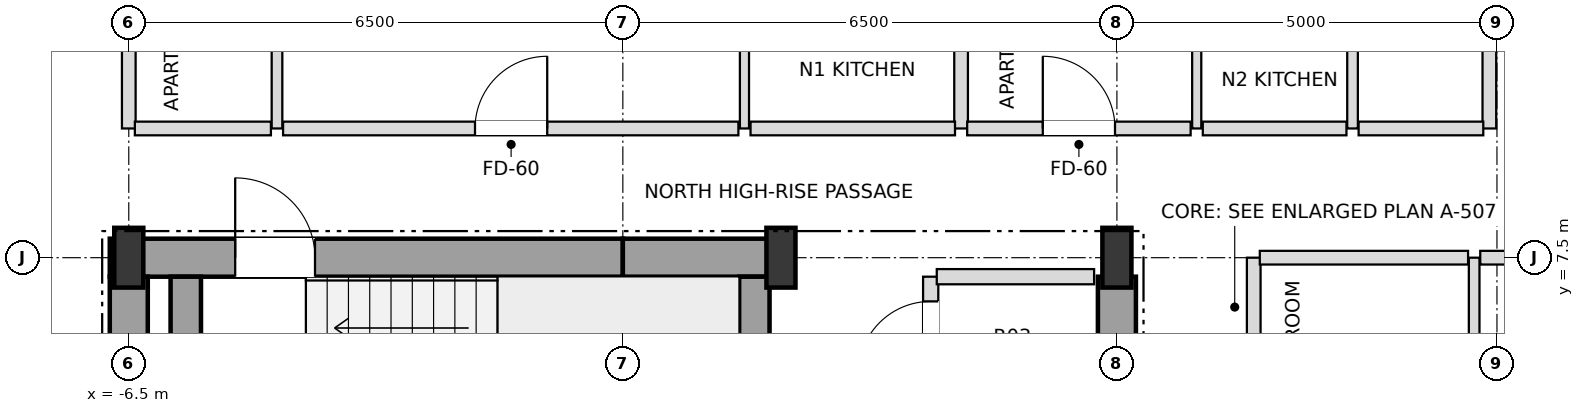
"""IFC4 building model, lengths in metres.
Left out: names, types, materials, properties, quantities, classifications, styles, units other than length and angle.
Written with IfcOpenShell. Run it as: python <this file> out.ifc"""

import sys

from ifc_helpers import new_model, si_unit, direction, frame, frame_2d, origin, origin_2d, place, context, subcontext, project, spatial, rectangle, i_section, extrude, element, fill, save


model = new_model("IFC4")
c1 = context("Model", 3, precision=1e-05, world=origin(), true_north=direction((0.0, 1.0)))
c2 = subcontext(c1, "Body", "Model", "MODEL_VIEW")
j1 = project(units=[si_unit("LENGTHUNIT", "METRE"), si_unit("PLANEANGLEUNIT", "RADIAN")], contexts=[c1])
p1 = place(None, origin())
s1 = spatial("IfcSite", under=j1, at=p1, CompositionType="ELEMENT")
p2 = place(p1, origin())
s2 = spatial("IfcBuilding", under=s1, at=p2, CompositionType="ELEMENT")
p3 = place(p2, frame((0.0, 0.0, 247.5)))
s3 = spatial("IfcBuildingStorey", under=s2, at=p3, CompositionType="ELEMENT", Elevation=247.5)
for number, where, z_axis, x_axis in (
    (1, (-6.5, 7.5, 0.0), (0.0, 0.0, 1.0), (1.0, 0.0, 0.0)),
    (2, (2.08, 7.5, 0.0), (0.0, 0.0, 1.0), (1.0, 0.0, 0.0)),
    (3, (6.5, 7.5, 0.0), (0.0, 0.0, 1.0), (1.0, 0.0, 0.0)),
):
    element("IfcColumn", number, at=place(p3, frame(where, z_axis=z_axis, x_axis=x_axis)), inside=s3, PredefinedType="COLUMN", context=c2, shape_type="SweptSolid", body=[
        extrude(i_section(OverallWidth=0.382, OverallDepth=0.786, WebThickness=0.02, FlangeThickness=0.033, at=origin_2d()), origin(), (0.0, 0.0, 1.0), 3.6),
    ])
p4 = place(p3, frame((-6.75, 7.5, 0.0), z_axis=(0.0, 0.0, 1.0), x_axis=(1.0, 0.0, 0.0)))
e4 = element("IfcWall", 4, at=p4, inside=s3, PredefinedType="SHEAR", context=c2, shape_type="SweptSolid", body=[
    extrude(rectangle(XDim=6.75, YDim=0.5, at=frame_2d((3.375, 0.0))), origin(), (0.0, 0.0, 1.0), 3.38),
])
p5 = place(p4, frame((1.65, 0.0, 0.0)))
e5 = element("IfcOpeningElement", 5, at=p5, cuts=e4, PredefinedType="OPENING", context=c2, shape_type="SweptSolid", body=[
    extrude(rectangle(XDim=1.05, YDim=2.15, at=frame_2d((0.525, 1.075))), frame((0.0, 0.26, 0.0), z_axis=(0.0, -1.0, 0.0), x_axis=(1.0, 0.0, 0.0)), (0.0, 0.0, 1.0), 0.52),
])
p6 = place(p3, frame((0.0, 7.5, 0.0), z_axis=(0.0, 0.0, 1.0), x_axis=(1.0, 0.0, 0.0)))
e6 = element("IfcWall", 6, at=p6, inside=s3, PredefinedType="SHEAR", context=c2, shape_type="SweptSolid", body=[
    extrude(rectangle(XDim=2.08, YDim=0.5, at=frame_2d((1.04, 0.0))), origin(), (0.0, 0.0, 1.0), 3.38),
])
for number, where, z_axis, x_axis in (
    (7, (-6.5, 3.95, 0.0), (0.0, 0.0, 1.0), (0.0, 1.0, 0.0)),
    (8, (6.5, 3.95, 0.0), (0.0, 0.0, 1.0), (0.0, 1.0, 0.0)),
):
    element("IfcWall", number, at=place(p3, frame(where, z_axis=z_axis, x_axis=x_axis)), inside=s3, PredefinedType="SHEAR", context=c2, shape_type="SweptSolid", body=[
        extrude(rectangle(XDim=3.3, YDim=0.5, at=frame_2d((1.65, 0.0))), origin(), (0.0, 0.0, 1.0), 3.38),
    ])
for number, where, z_axis, x_axis in (
    (9, (1.73, 3.95, 0.0), (0.0, 0.0, 1.0), (0.0, 1.0, 0.0)),
    (10, (-5.75, 3.95, 0.0), (0.0, 0.0, 1.0), (0.0, 1.0, 0.0)),
):
    element("IfcWall", number, at=place(p3, frame(where, z_axis=z_axis, x_axis=x_axis)), inside=s3, PredefinedType="SHEAR", context=c2, shape_type="SweptSolid", body=[
        extrude(rectangle(XDim=3.3, YDim=0.4, at=frame_2d((1.65, 0.0))), origin(), (0.0, 0.0, 1.0), 3.38),
    ])
p7 = place(p3, frame((-6.5, 9.2, 0.0), z_axis=(0.0, 0.0, 1.0), x_axis=(0.0, 1.0, 0.0)))
e11 = element("IfcWall", 11, at=p7, inside=s3, PredefinedType="PARTITIONING", context=c2, shape_type="SweptSolid", body=[
    extrude(rectangle(XDim=10.7, YDim=0.18, at=frame_2d((5.35, 0.0))), origin(), (0.0, 0.0, 1.0), 2.826),
])
p8 = place(p3, frame((-4.55, 9.2, 0.0), z_axis=(0.0, 0.0, 1.0), x_axis=(0.0, 1.0, 0.0)))
e12 = element("IfcWall", 12, at=p8, inside=s3, PredefinedType="PARTITIONING", context=c2, shape_type="SweptSolid", body=[
    extrude(rectangle(XDim=4.7, YDim=0.14, at=frame_2d((2.35, 0.0))), origin(), (0.0, 0.0, 1.0), 3.38),
])
p9 = place(p8, frame((1.9, 0.0, 0.0)))
e13 = element("IfcOpeningElement", 13, at=p9, cuts=e12, PredefinedType="OPENING", context=c2, shape_type="SweptSolid", body=[
    extrude(rectangle(XDim=0.9, YDim=2.1, at=frame_2d((0.45, 1.05))), frame((0.0, 0.08, 0.0), z_axis=(0.0, -1.0, 0.0), x_axis=(1.0, 0.0, 0.0)), (0.0, 0.0, 1.0), 0.16),
])
p10 = place(p3, frame((1.6, 9.2, 0.0), z_axis=(0.0, 0.0, 1.0), x_axis=(0.0, 1.0, 0.0)))
e14 = element("IfcWall", 14, at=p10, inside=s3, PredefinedType="PARTITIONING", context=c2, shape_type="SweptSolid", body=[
    extrude(rectangle(XDim=10.7, YDim=0.12, at=frame_2d((5.35, 0.0))), origin(), (0.0, 0.0, 1.0), 3.018),
])
p11 = place(p10, frame((1.875, 0.0, 0.0)))
e15 = element("IfcOpeningElement", 15, at=p11, cuts=e14, PredefinedType="OPENING", context=c2, shape_type="SweptSolid", body=[
    extrude(rectangle(XDim=0.95, YDim=2.1, at=frame_2d((0.475, 1.05))), frame((0.0, 0.07, 0.0), z_axis=(0.0, -1.0, 0.0), x_axis=(1.0, 0.0, 0.0)), (0.0, 0.0, 1.0), 0.14),
])
p12 = place(p10, frame((7.25, 0.0, 0.0)))
e16 = element("IfcOpeningElement", 16, at=p12, cuts=e14, PredefinedType="OPENING", context=c2, shape_type="SweptSolid", body=[
    extrude(rectangle(XDim=0.9, YDim=2.1, at=frame_2d((0.45, 1.05))), frame((0.0, 0.07, 0.0), z_axis=(0.0, -1.0, 0.0), x_axis=(1.0, 0.0, 0.0)), (0.0, 0.0, 1.0), 0.14),
])
p13 = place(p3, frame((4.05, 0.45, 0.0), z_axis=(0.0, 0.0, 1.0), x_axis=(0.0, 1.0, 0.0)))
e17 = element("IfcWall", 17, at=p13, inside=s3, PredefinedType="SOLIDWALL", context=c2, shape_type="SweptSolid", body=[
    extrude(rectangle(XDim=6.8, YDim=0.2, at=frame_2d((3.4, 0.0))), origin(), (0.0, 0.0, 1.0), 3.38),
])
p14 = place(p13, frame((1.875, 0.0, 0.0)))
e18 = element("IfcOpeningElement", 18, at=p14, cuts=e17, PredefinedType="OPENING", context=c2, shape_type="SweptSolid", body=[
    extrude(rectangle(XDim=0.95, YDim=2.15, at=frame_2d((0.475, 1.075))), frame((0.0, 0.11, 0.0), z_axis=(0.0, -1.0, 0.0), x_axis=(1.0, 0.0, 0.0)), (0.0, 0.0, 1.0), 0.22),
])
p15 = place(p13, frame((5.525, 0.0, 0.0)))
e19 = element("IfcOpeningElement", 19, at=p15, cuts=e17, PredefinedType="OPENING", context=c2, shape_type="SweptSolid", body=[
    extrude(rectangle(XDim=0.95, YDim=2.15, at=frame_2d((0.475, 1.075))), frame((0.0, 0.11, 0.0), z_axis=(0.0, -1.0, 0.0), x_axis=(1.0, 0.0, 0.0)), (0.0, 0.0, 1.0), 0.22),
])
p16 = place(p3, frame((4.45, 9.2, 0.0), z_axis=(0.0, 0.0, 1.0), x_axis=(0.0, 1.0, 0.0)))
e20 = element("IfcWall", 20, at=p16, inside=s3, PredefinedType="PARTITIONING", context=c2, shape_type="SweptSolid", body=[
    extrude(rectangle(XDim=10.7, YDim=0.18, at=frame_2d((5.35, 0.0))), origin(), (0.0, 0.0, 1.0), 3.018),
])
p17 = place(p3, frame((7.55, 9.2, 0.0), z_axis=(0.0, 0.0, 1.0), x_axis=(0.0, 1.0, 0.0)))
e21 = element("IfcWall", 21, at=p17, inside=s3, PredefinedType="PARTITIONING", context=c2, shape_type="SweptSolid", body=[
    extrude(rectangle(XDim=4.7, YDim=0.12, at=frame_2d((2.35, 0.0))), origin(), (0.0, 0.0, 1.0), 2.826),
])
p18 = place(p17, frame((1.875, 0.0, 0.0)))
e22 = element("IfcOpeningElement", 22, at=p18, cuts=e21, PredefinedType="OPENING", context=c2, shape_type="SweptSolid", body=[
    extrude(rectangle(XDim=0.95, YDim=2.1, at=frame_2d((0.475, 1.05))), frame((0.0, 0.07, 0.0), z_axis=(0.0, -1.0, 0.0), x_axis=(1.0, 0.0, 0.0)), (0.0, 0.0, 1.0), 0.14),
])
p19 = place(p3, frame((8.3, -7.5, 0.0), z_axis=(0.0, 0.0, 1.0), x_axis=(0.0, 1.0, 0.0)))
e23 = element("IfcWall", 23, at=p19, inside=s3, PredefinedType="PARTITIONING", context=c2, shape_type="SweptSolid", body=[
    extrude(rectangle(XDim=15.0, YDim=0.18, at=frame_2d((7.5, 0.0))), origin(), (0.0, 0.0, 1.0), 3.38),
])
p20 = place(p19, frame((2.355, 0.0, 0.0)))
e24 = element("IfcOpeningElement", 24, at=p20, cuts=e23, PredefinedType="OPENING", context=c2, shape_type="SweptSolid", body=[
    extrude(rectangle(XDim=0.95, YDim=2.15, at=frame_2d((0.475, 1.075))), frame((0.0, 0.1, 0.0), z_axis=(0.0, -1.0, 0.0), x_axis=(1.0, 0.0, 0.0)), (0.0, 0.0, 1.0), 0.2),
])
p21 = place(p3, frame((9.6, 9.2, 0.0), z_axis=(0.0, 0.0, 1.0), x_axis=(0.0, 1.0, 0.0)))
e25 = element("IfcWall", 25, at=p21, inside=s3, PredefinedType="PARTITIONING", context=c2, shape_type="SweptSolid", body=[
    extrude(rectangle(XDim=4.7, YDim=0.14, at=frame_2d((2.35, 0.0))), origin(), (0.0, 0.0, 1.0), 2.826),
])
p22 = place(p21, frame((1.9, 0.0, 0.0)))
e26 = element("IfcOpeningElement", 26, at=p22, cuts=e25, PredefinedType="OPENING", context=c2, shape_type="SweptSolid", body=[
    extrude(rectangle(XDim=0.9, YDim=2.1, at=frame_2d((0.45, 1.05))), frame((0.0, 0.08, 0.0), z_axis=(0.0, -1.0, 0.0), x_axis=(1.0, 0.0, 0.0)), (0.0, 0.0, 1.0), 0.16),
])
p23 = place(p3, frame((11.2, -7.5, 0.0), z_axis=(0.0, 0.0, 1.0), x_axis=(0.0, 1.0, 0.0)))
e27 = element("IfcWall", 27, at=p23, inside=s3, PredefinedType="PARTITIONING", context=c2, shape_type="SweptSolid", body=[
    extrude(rectangle(XDim=15.0, YDim=0.14, at=frame_2d((7.5, 0.0))), origin(), (0.0, 0.0, 1.0), 3.38),
])
p24 = place(p23, frame((3.475, 0.0, 0.0)))
e28 = element("IfcOpeningElement", 28, at=p24, cuts=e27, PredefinedType="OPENING", context=c2, shape_type="SweptSolid", body=[
    extrude(rectangle(XDim=0.95, YDim=2.1, at=frame_2d((0.475, 1.05))), frame((0.0, 0.08, 0.0), z_axis=(0.0, -1.0, 0.0), x_axis=(1.0, 0.0, 0.0)), (0.0, 0.0, 1.0), 0.16),
])
p25 = place(p3, frame((11.4, 9.2, 0.0), z_axis=(0.0, 0.0, 1.0), x_axis=(0.0, 1.0, 0.0)))
e29 = element("IfcWall", 29, at=p25, inside=s3, PredefinedType="PARTITIONING", context=c2, shape_type="SweptSolid", body=[
    extrude(rectangle(XDim=5.07, YDim=0.18, at=frame_2d((2.535, 0.0))), origin(), (0.0, 0.0, 1.0), 2.748),
])
p26 = place(p3, frame((4.13, 7.25, 0.0), z_axis=(0.0, 0.0, 1.0), x_axis=(1.0, 0.0, 0.0)))
e30 = element("IfcWall", 30, at=p26, inside=s3, PredefinedType="SOLIDWALL", context=c2, shape_type="SweptSolid", body=[
    extrude(rectangle(XDim=2.07, YDim=0.2, at=frame_2d((1.035, 0.0))), origin(), (0.0, 0.0, 1.0), 3.38),
])
p27 = place(p3, frame((8.38, 7.5, 0.0), z_axis=(0.0, 0.0, 1.0), x_axis=(1.0, 0.0, 0.0)))
e31 = element("IfcWall", 31, at=p27, inside=s3, PredefinedType="PARTITIONING", context=c2, shape_type="SweptSolid", body=[
    extrude(rectangle(XDim=2.74, YDim=0.18, at=frame_2d((1.37, 0.0))), origin(), (0.0, 0.0, 1.0), 2.826),
])
p28 = place(p3, frame((11.28, 7.5, 0.0), z_axis=(0.0, 0.0, 1.0), x_axis=(1.0, 0.0, 0.0)))
e32 = element("IfcWall", 32, at=p28, inside=s3, PredefinedType="PARTITIONING", context=c2, shape_type="SweptSolid", body=[
    extrude(rectangle(XDim=5.62, YDim=0.18, at=frame_2d((2.81, 0.0))), origin(), (0.0, 0.0, 1.0), 2.826),
])
p29 = place(p3, frame((-6.42, 9.2, 0.0), z_axis=(0.0, 0.0, 1.0), x_axis=(1.0, 0.0, 0.0)))
e33 = element("IfcWall", 33, at=p29, inside=s3, PredefinedType="PARTITIONING", context=c2, shape_type="SweptSolid", body=[
    extrude(rectangle(XDim=1.79, YDim=0.18, at=frame_2d((0.895, 0.0))), origin(), (0.0, 0.0, 1.0), 3.38),
])
p30 = place(p3, frame((-4.47, 9.2, 0.0), z_axis=(0.0, 0.0, 1.0), x_axis=(1.0, 0.0, 0.0)))
e34 = element("IfcWall", 34, at=p30, inside=s3, PredefinedType="PARTITIONING", context=c2, shape_type="SweptSolid", body=[
    extrude(rectangle(XDim=5.99, YDim=0.18, at=frame_2d((2.995, 0.0))), origin(), (0.0, 0.0, 1.0), 3.38),
])
p31 = place(p30, frame((2.525, 0.0, 0.0)))
e35 = element("IfcOpeningElement", 35, at=p31, cuts=e34, PredefinedType="OPENING", context=c2, shape_type="SweptSolid", body=[
    extrude(rectangle(XDim=0.95, YDim=2.15, at=frame_2d((0.475, 1.075))), frame((0.0, 0.1, 0.0), z_axis=(0.0, -1.0, 0.0), x_axis=(1.0, 0.0, 0.0)), (0.0, 0.0, 1.0), 0.2),
])
p32 = place(p3, frame((1.68, 9.2, 0.0), z_axis=(0.0, 0.0, 1.0), x_axis=(1.0, 0.0, 0.0)))
e36 = element("IfcWall", 36, at=p32, inside=s3, PredefinedType="PARTITIONING", context=c2, shape_type="SweptSolid", body=[
    extrude(rectangle(XDim=2.69, YDim=0.18, at=frame_2d((1.345, 0.0))), origin(), (0.0, 0.0, 1.0), 3.38),
])
p33 = place(p3, frame((4.53, 9.2, 0.0), z_axis=(0.0, 0.0, 1.0), x_axis=(1.0, 0.0, 0.0)))
e37 = element("IfcWall", 37, at=p33, inside=s3, PredefinedType="PARTITIONING", context=c2, shape_type="SweptSolid", body=[
    extrude(rectangle(XDim=2.94, YDim=0.18, at=frame_2d((1.47, 0.0))), origin(), (0.0, 0.0, 1.0), 2.826),
])
p34 = place(p33, frame((0.995, 0.0, 0.0)))
e38 = element("IfcOpeningElement", 38, at=p34, cuts=e37, PredefinedType="OPENING", context=c2, shape_type="SweptSolid", body=[
    extrude(rectangle(XDim=0.95, YDim=2.15, at=frame_2d((0.475, 1.075))), frame((0.0, 0.1, 0.0), z_axis=(0.0, -1.0, 0.0), x_axis=(1.0, 0.0, 0.0)), (0.0, 0.0, 1.0), 0.2),
])
p35 = place(p3, frame((7.63, 9.2, 0.0), z_axis=(0.0, 0.0, 1.0), x_axis=(1.0, 0.0, 0.0)))
e39 = element("IfcWall", 39, at=p35, inside=s3, PredefinedType="PARTITIONING", context=c2, shape_type="SweptSolid", body=[
    extrude(rectangle(XDim=1.89, YDim=0.18, at=frame_2d((0.945, 0.0))), origin(), (0.0, 0.0, 1.0), 3.38),
])
p36 = place(p3, frame((9.68, 9.2, 0.0), z_axis=(0.0, 0.0, 1.0), x_axis=(1.0, 0.0, 0.0)))
e40 = element("IfcWall", 40, at=p36, inside=s3, PredefinedType="PARTITIONING", context=c2, shape_type="SweptSolid", body=[
    extrude(rectangle(XDim=1.64, YDim=0.18, at=frame_2d((0.82, 0.0))), origin(), (0.0, 0.0, 1.0), 3.38),
])
p37 = place(p5, origin())
e41 = element("IfcDoor", 41, at=p37, inside=s3, OperationType="SINGLE_SWING_LEFT", PredefinedType="DOOR", context=c2, shape_type="SweptSolid", body=[
    extrude(rectangle(XDim=1.05, YDim=2.15, at=frame_2d((0.525, 1.075))), frame((0.0, 0.025, 0.0), z_axis=(0.0, -1.0, 0.0), x_axis=(1.0, 0.0, 0.0)), (0.0, 0.0, 1.0), 0.05),
])
fill(e5, e41)
p38 = place(p15, origin())
e42 = element("IfcDoor", 42, at=p38, inside=s3, OperationType="SINGLE_SWING_LEFT", PredefinedType="DOOR", context=c2, shape_type="SweptSolid", body=[
    extrude(rectangle(XDim=0.95, YDim=2.15, at=frame_2d((0.475, 1.075))), frame((0.0, 0.025, 0.0), z_axis=(0.0, -1.0, 0.0), x_axis=(1.0, 0.0, 0.0)), (0.0, 0.0, 1.0), 0.05),
])
fill(e19, e42)
p39 = place(p31, origin())
e43 = element("IfcDoor", 43, at=p39, inside=s3, OperationType="SINGLE_SWING_RIGHT", PredefinedType="DOOR", context=c2, shape_type="SweptSolid", body=[
    extrude(rectangle(XDim=0.95, YDim=2.15, at=frame_2d((0.475, 1.075))), frame((0.0, 0.025, 0.0), z_axis=(0.0, -1.0, 0.0), x_axis=(1.0, 0.0, 0.0)), (0.0, 0.0, 1.0), 0.05),
])
fill(e35, e43)
p40 = place(p34, origin())
e44 = element("IfcDoor", 44, at=p40, inside=s3, OperationType="SINGLE_SWING_LEFT", PredefinedType="DOOR", context=c2, shape_type="SweptSolid", body=[
    extrude(rectangle(XDim=0.95, YDim=2.15, at=frame_2d((0.475, 1.075))), frame((0.0, 0.025, 0.0), z_axis=(0.0, -1.0, 0.0), x_axis=(1.0, 0.0, 0.0)), (0.0, 0.0, 1.0), 0.05),
])
fill(e38, e44)
save(model, sys.argv[1])
